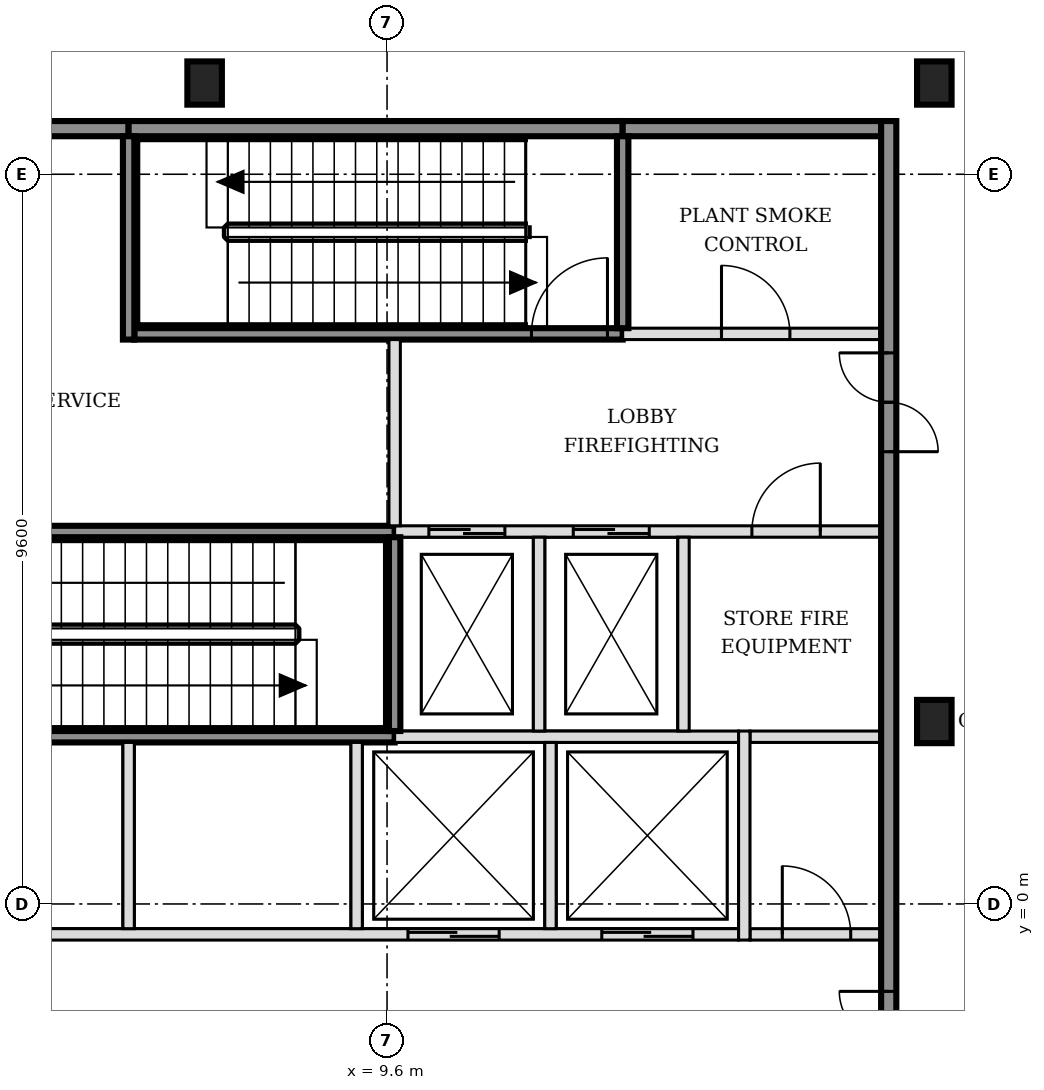
"""IFC4 building model, lengths in metres.
Left out: names, types, materials, properties, quantities, classifications, styles, units other than length and angle.
Written with IfcOpenShell. Run it as: python <this file> out.ifc"""

import sys

from ifc_helpers import new_model, si_unit, direction, frame, frame_2d, origin, origin_2d, place, context, subcontext, project, spatial, rectangle, i_section, extrude, element, fill, save


model = new_model("IFC4")
c1 = context("Model", 3, precision=1e-05, world=origin(), true_north=direction((0.0, 1.0)))
c2 = subcontext(c1, "Body", "Model", "MODEL_VIEW")
j1 = project(units=[si_unit("LENGTHUNIT", "METRE"), si_unit("PLANEANGLEUNIT", "RADIAN")], contexts=[c1])
p1 = place(None, origin())
s1 = spatial("IfcSite", under=j1, at=p1, CompositionType="ELEMENT")
p2 = place(p1, origin())
s2 = spatial("IfcBuilding", under=s1, at=p2, CompositionType="ELEMENT")
p3 = place(p2, frame((0.0, 0.0, 30.6)))
s3 = spatial("IfcBuildingStorey", under=s2, at=p3, CompositionType="ELEMENT", Elevation=30.6)
for number, where, z_axis, x_axis in (
    (1, (16.8, 2.4, -0.2), (0.0, 0.0, 1.0), (1.0, 0.0, 0.0)),
    (2, (7.2, 10.8, -0.2), (0.0, 0.0, 1.0), (1.0, 0.0, 0.0)),
    (3, (16.8, 10.8, -0.2), (0.0, 0.0, 1.0), (1.0, 0.0, 0.0)),
):
    element("IfcColumn", number, at=place(p3, frame(where, z_axis=z_axis, x_axis=x_axis)), inside=s3, PredefinedType="COLUMN", context=c2, shape_type="SweptSolid", body=[
        extrude(i_section(OverallWidth=0.454, OverallDepth=0.569, WebThickness=0.078, FlangeThickness=0.125, FilletRadius=0.015, at=origin_2d()), origin(), (0.0, 0.0, 1.0), 4.8),
    ])
p4 = place(p3, frame((-1.7, -0.4, 0.0), z_axis=(0.0, 0.0, 1.0), x_axis=(1.0, 0.0, 0.0)))
e4 = element("IfcWall", 4, at=p4, inside=s3, PredefinedType="SOLIDWALL", context=c2, shape_type="SweptSolid", body=[
    extrude(rectangle(XDim=15.925, YDim=0.15, at=frame_2d((7.962, 0.0))), origin(), (0.0, 0.0, 1.0), 4.6),
])
p5 = place(p4, frame((0.6, 0.0, 0.0)))
e5 = element("IfcOpeningElement", 5, at=p5, cuts=e4, PredefinedType="OPENING", context=c2, shape_type="SweptSolid", body=[
    extrude(rectangle(XDim=1.1, YDim=2.1, at=frame_2d((0.55, 1.05))), frame((0.0, 0.085, 0.0), z_axis=(0.0, -1.0, 0.0), x_axis=(1.0, 0.0, 0.0)), (0.0, 0.0, 1.0), 0.17),
])
p6 = place(p4, frame((3.1, 0.0, 0.0)))
e6 = element("IfcOpeningElement", 6, at=p6, cuts=e4, PredefinedType="OPENING", context=c2, shape_type="SweptSolid", body=[
    extrude(rectangle(XDim=1.1, YDim=2.1, at=frame_2d((0.55, 1.05))), frame((0.0, 0.085, 0.0), z_axis=(0.0, -1.0, 0.0), x_axis=(1.0, 0.0, 0.0)), (0.0, 0.0, 1.0), 0.17),
])
p7 = place(p4, frame((11.575, 0.0, 0.0)))
e7 = element("IfcOpeningElement", 7, at=p7, cuts=e4, PredefinedType="OPENING", context=c2, shape_type="SweptSolid", body=[
    extrude(rectangle(XDim=1.2, YDim=2.1, at=frame_2d((0.6, 1.05))), frame((0.0, 0.085, 0.0), z_axis=(0.0, -1.0, 0.0), x_axis=(1.0, 0.0, 0.0)), (0.0, 0.0, 1.0), 0.17),
])
p8 = place(p4, frame((14.125, 0.0, 0.0)))
e8 = element("IfcOpeningElement", 8, at=p8, cuts=e4, PredefinedType="OPENING", context=c2, shape_type="SweptSolid", body=[
    extrude(rectangle(XDim=1.2, YDim=2.1, at=frame_2d((0.6, 1.05))), frame((0.0, 0.085, 0.0), z_axis=(0.0, -1.0, 0.0), x_axis=(1.0, 0.0, 0.0)), (0.0, 0.0, 1.0), 0.17),
])
p9 = place(p3, frame((14.375, -0.4, 0.0), z_axis=(0.0, 0.0, 1.0), x_axis=(1.0, 0.0, 0.0)))
e9 = element("IfcWall", 9, at=p9, inside=s3, PredefinedType="PARTITIONING", context=c2, shape_type="SweptSolid", body=[
    extrude(rectangle(XDim=1.725, YDim=0.15, at=frame_2d((0.863, 0.0))), origin(), (0.0, 0.0, 1.0), 4.6),
])
p10 = place(p9, frame((0.425, 0.0, 0.0)))
e10 = element("IfcOpeningElement", 10, at=p10, cuts=e9, PredefinedType="OPENING", context=c2, shape_type="SweptSolid", body=[
    extrude(rectangle(XDim=0.9, YDim=2.1, at=frame_2d((0.45, 1.05))), frame((0.0, 0.085, 0.0), z_axis=(0.0, -1.0, 0.0), x_axis=(1.0, 0.0, 0.0)), (0.0, 0.0, 1.0), 0.17),
])
p11 = place(p3, frame((3.2, 2.2, 0.0), z_axis=(0.0, 0.0, 1.0), x_axis=(1.0, 0.0, 0.0)))
e11 = element("IfcWall", 11, at=p11, inside=s3, PredefinedType="SOLIDWALL", context=c2, shape_type="SweptSolid", body=[
    extrude(rectangle(XDim=6.5, YDim=0.15, at=frame_2d((3.25, 0.0))), origin(), (0.0, 0.0, 1.0), 4.6),
])
p12 = place(p3, frame((9.7, 2.2, 0.0), z_axis=(0.0, 0.0, 1.0), x_axis=(1.0, 0.0, 0.0)))
e12 = element("IfcWall", 12, at=p12, inside=s3, PredefinedType="SOLIDWALL", context=c2, shape_type="SweptSolid", body=[
    extrude(rectangle(XDim=4.525, YDim=0.15, at=frame_2d((2.263, 0.0))), origin(), (0.0, 0.0, 1.0), 4.6),
])
p13 = place(p3, frame((14.375, 2.2, 0.0), z_axis=(0.0, 0.0, 1.0), x_axis=(1.0, 0.0, 0.0)))
e13 = element("IfcWall", 13, at=p13, inside=s3, PredefinedType="PARTITIONING", context=c2, shape_type="SweptSolid", body=[
    extrude(rectangle(XDim=1.725, YDim=0.15, at=frame_2d((0.863, 0.0))), origin(), (0.0, 0.0, 1.0), 4.6),
])
p14 = place(p3, frame((3.275, 4.9, 0.0), z_axis=(0.0, 0.0, 1.0), x_axis=(1.0, 0.0, 0.0)))
e14 = element("IfcWall", 14, at=p14, inside=s3, PredefinedType="SOLIDWALL", context=c2, shape_type="SweptSolid", body=[
    extrude(rectangle(XDim=6.425, YDim=0.15, at=frame_2d((3.212, 0.0))), origin(), (0.0, 0.0, 1.0), 4.6),
])
p15 = place(p14, frame((0.1, 0.0, 0.0)))
e15 = element("IfcOpeningElement", 15, at=p15, cuts=e14, PredefinedType="OPENING", context=c2, shape_type="SweptSolid", body=[
    extrude(rectangle(XDim=1.0, YDim=2.1, at=frame_2d((0.5, 1.05))), frame((0.0, 0.085, 0.0), z_axis=(0.0, -1.0, 0.0), x_axis=(1.0, 0.0, 0.0)), (0.0, 0.0, 1.0), 0.17),
])
p16 = place(p3, frame((9.7, 4.9, 0.0), z_axis=(0.0, 0.0, 1.0), x_axis=(1.0, 0.0, 0.0)))
e16 = element("IfcWall", 16, at=p16, inside=s3, PredefinedType="SOLIDWALL", context=c2, shape_type="SweptSolid", body=[
    extrude(rectangle(XDim=6.4, YDim=0.15, at=frame_2d((3.2, 0.0))), origin(), (0.0, 0.0, 1.0), 4.6),
])
p17 = place(p16, frame((0.45, 0.0, 0.0)))
e17 = element("IfcOpeningElement", 17, at=p17, cuts=e16, PredefinedType="OPENING", context=c2, shape_type="SweptSolid", body=[
    extrude(rectangle(XDim=1.0, YDim=2.1, at=frame_2d((0.5, 1.05))), frame((0.0, 0.085, 0.0), z_axis=(0.0, -1.0, 0.0), x_axis=(1.0, 0.0, 0.0)), (0.0, 0.0, 1.0), 0.17),
])
p18 = place(p16, frame((2.35, 0.0, 0.0)))
e18 = element("IfcOpeningElement", 18, at=p18, cuts=e16, PredefinedType="OPENING", context=c2, shape_type="SweptSolid", body=[
    extrude(rectangle(XDim=1.0, YDim=2.1, at=frame_2d((0.5, 1.05))), frame((0.0, 0.085, 0.0), z_axis=(0.0, -1.0, 0.0), x_axis=(1.0, 0.0, 0.0)), (0.0, 0.0, 1.0), 0.17),
])
p19 = place(p16, frame((4.7, 0.0, 0.0)))
e19 = element("IfcOpeningElement", 19, at=p19, cuts=e16, PredefinedType="OPENING", context=c2, shape_type="SweptSolid", body=[
    extrude(rectangle(XDim=0.9, YDim=2.1, at=frame_2d((0.45, 1.05))), frame((0.0, 0.085, 0.0), z_axis=(0.0, -1.0, 0.0), x_axis=(1.0, 0.0, 0.0)), (0.0, 0.0, 1.0), 0.17),
])
p20 = place(p3, frame((6.275, 7.5, 0.0), z_axis=(0.0, 0.0, 1.0), x_axis=(1.0, 0.0, 0.0)))
e20 = element("IfcWall", 20, at=p20, inside=s3, PredefinedType="SOLIDWALL", context=c2, shape_type="SweptSolid", body=[
    extrude(rectangle(XDim=6.425, YDim=0.15, at=frame_2d((3.212, 0.0))), origin(), (0.0, 0.0, 1.0), 4.6),
])
p21 = place(p20, frame((5.225, 0.0, 0.0)))
e21 = element("IfcOpeningElement", 21, at=p21, cuts=e20, PredefinedType="OPENING", context=c2, shape_type="SweptSolid", body=[
    extrude(rectangle(XDim=1.0, YDim=2.1, at=frame_2d((0.5, 1.05))), frame((0.0, 0.085, 0.0), z_axis=(0.0, -1.0, 0.0), x_axis=(1.0, 0.0, 0.0)), (0.0, 0.0, 1.0), 0.17),
])
p22 = place(p3, frame((12.7, 7.5, 0.0), z_axis=(0.0, 0.0, 1.0), x_axis=(1.0, 0.0, 0.0)))
e22 = element("IfcWall", 22, at=p22, inside=s3, PredefinedType="SOLIDWALL", context=c2, shape_type="SweptSolid", body=[
    extrude(rectangle(XDim=3.4, YDim=0.15, at=frame_2d((1.7, 0.0))), origin(), (0.0, 0.0, 1.0), 4.6),
])
p23 = place(p22, frame((1.3, 0.0, 0.0)))
e23 = element("IfcOpeningElement", 23, at=p23, cuts=e22, PredefinedType="OPENING", context=c2, shape_type="SweptSolid", body=[
    extrude(rectangle(XDim=0.9, YDim=2.1, at=frame_2d((0.45, 1.05))), frame((0.0, 0.085, 0.0), z_axis=(0.0, -1.0, 0.0), x_axis=(1.0, 0.0, 0.0)), (0.0, 0.0, 1.0), 0.17),
])
p24 = place(p3, frame((-1.7, 10.2, 0.0), z_axis=(0.0, 0.0, 1.0), x_axis=(1.0, 0.0, 0.0)))
e24 = element("IfcWall", 24, at=p24, inside=s3, PredefinedType="SOLIDWALL", context=c2, shape_type="SweptSolid", body=[
    extrude(rectangle(XDim=7.9, YDim=0.2, at=frame_2d((3.95, 0.0))), origin(), (0.0, 0.0, 1.0), 4.6),
])
p25 = place(p3, frame((6.2, 10.2, 0.0), z_axis=(0.0, 0.0, 1.0), x_axis=(1.0, 0.0, 0.0)))
e25 = element("IfcWall", 25, at=p25, inside=s3, PredefinedType="SOLIDWALL", context=c2, shape_type="SweptSolid", body=[
    extrude(rectangle(XDim=6.5, YDim=0.2, at=frame_2d((3.25, 0.0))), origin(), (0.0, 0.0, 1.0), 4.6),
])
p26 = place(p3, frame((12.7, 10.2, 0.0), z_axis=(0.0, 0.0, 1.0), x_axis=(1.0, 0.0, 0.0)))
e26 = element("IfcWall", 26, at=p26, inside=s3, PredefinedType="SOLIDWALL", context=c2, shape_type="SweptSolid", body=[
    extrude(rectangle(XDim=3.4, YDim=0.2, at=frame_2d((1.7, 0.0))), origin(), (0.0, 0.0, 1.0), 4.6),
])
p27 = place(p3, frame((6.2, -0.325, 0.0), z_axis=(0.0, 0.0, 1.0), x_axis=(0.0, 1.0, 0.0)))
e27 = element("IfcWall", 27, at=p27, inside=s3, PredefinedType="SOLIDWALL", context=c2, shape_type="SweptSolid", body=[
    extrude(rectangle(XDim=2.45, YDim=0.15, at=frame_2d((1.225, 0.0))), origin(), (0.0, 0.0, 1.0), 4.6),
])
p28 = place(p3, frame((6.2, 7.425, 0.0), z_axis=(0.0, 0.0, 1.0), x_axis=(0.0, 1.0, 0.0)))
e28 = element("IfcWall", 28, at=p28, inside=s3, PredefinedType="SOLIDWALL", context=c2, shape_type="SweptSolid", body=[
    extrude(rectangle(XDim=2.675, YDim=0.15, at=frame_2d((1.337, 0.0))), origin(), (0.0, 0.0, 1.0), 4.6),
])
p29 = place(p3, frame((9.2, -0.325, 0.0), z_axis=(0.0, 0.0, 1.0), x_axis=(0.0, 1.0, 0.0)))
e29 = element("IfcWall", 29, at=p29, inside=s3, PredefinedType="SOLIDWALL", context=c2, shape_type="SweptSolid", body=[
    extrude(rectangle(XDim=2.45, YDim=0.15, at=frame_2d((1.225, 0.0))), origin(), (0.0, 0.0, 1.0), 4.6),
])
p30 = place(p3, frame((9.7, 2.275, 0.0), z_axis=(0.0, 0.0, 1.0), x_axis=(0.0, 1.0, 0.0)))
e30 = element("IfcWall", 30, at=p30, inside=s3, PredefinedType="SOLIDWALL", context=c2, shape_type="SweptSolid", body=[
    extrude(rectangle(XDim=2.55, YDim=0.15, at=frame_2d((1.275, 0.0))), origin(), (0.0, 0.0, 1.0), 4.6),
])
p31 = place(p3, frame((9.7, 4.975, 0.0), z_axis=(0.0, 0.0, 1.0), x_axis=(0.0, 1.0, 0.0)))
e31 = element("IfcWall", 31, at=p31, inside=s3, PredefinedType="SOLIDWALL", context=c2, shape_type="SweptSolid", body=[
    extrude(rectangle(XDim=2.45, YDim=0.15, at=frame_2d((1.225, 0.0))), origin(), (0.0, 0.0, 1.0), 4.6),
])
p32 = place(p3, frame((11.6, 2.275, 0.0), z_axis=(0.0, 0.0, 1.0), x_axis=(0.0, 1.0, 0.0)))
e32 = element("IfcWall", 32, at=p32, inside=s3, PredefinedType="SOLIDWALL", context=c2, shape_type="SweptSolid", body=[
    extrude(rectangle(XDim=2.55, YDim=0.15, at=frame_2d((1.275, 0.0))), origin(), (0.0, 0.0, 1.0), 4.6),
])
p33 = place(p3, frame((11.75, -0.325, 0.0), z_axis=(0.0, 0.0, 1.0), x_axis=(0.0, 1.0, 0.0)))
e33 = element("IfcWall", 33, at=p33, inside=s3, PredefinedType="SOLIDWALL", context=c2, shape_type="SweptSolid", body=[
    extrude(rectangle(XDim=2.45, YDim=0.15, at=frame_2d((1.225, 0.0))), origin(), (0.0, 0.0, 1.0), 4.6),
])
p34 = place(p3, frame((12.7, 7.575, 0.0), z_axis=(0.0, 0.0, 1.0), x_axis=(0.0, 1.0, 0.0)))
e34 = element("IfcWall", 34, at=p34, inside=s3, PredefinedType="SOLIDWALL", context=c2, shape_type="SweptSolid", body=[
    extrude(rectangle(XDim=2.525, YDim=0.15, at=frame_2d((1.263, 0.0))), origin(), (0.0, 0.0, 1.0), 4.6),
])
p35 = place(p3, frame((13.5, 2.275, 0.0), z_axis=(0.0, 0.0, 1.0), x_axis=(0.0, 1.0, 0.0)))
e35 = element("IfcWall", 35, at=p35, inside=s3, PredefinedType="SOLIDWALL", context=c2, shape_type="SweptSolid", body=[
    extrude(rectangle(XDim=2.55, YDim=0.15, at=frame_2d((1.275, 0.0))), origin(), (0.0, 0.0, 1.0), 4.6),
])
p36 = place(p3, frame((14.3, -0.475, 0.0), z_axis=(0.0, 0.0, 1.0), x_axis=(0.0, 1.0, 0.0)))
e36 = element("IfcWall", 36, at=p36, inside=s3, PredefinedType="SOLIDWALL", context=c2, shape_type="SweptSolid", body=[
    extrude(rectangle(XDim=2.75, YDim=0.15, at=frame_2d((1.375, 0.0))), origin(), (0.0, 0.0, 1.0), 4.6),
])
p37 = place(p3, frame((16.2, -5.5, 0.0), z_axis=(0.0, 0.0, 1.0), x_axis=(0.0, 1.0, 0.0)))
e37 = element("IfcWall", 37, at=p37, inside=s3, PredefinedType="SOLIDWALL", context=c2, shape_type="SweptSolid", body=[
    extrude(rectangle(XDim=15.8, YDim=0.2, at=frame_2d((7.9, 0.0))), origin(), (0.0, 0.0, 1.0), 4.6),
])
p38 = place(p37, frame((3.05, 0.0, 0.0)))
e38 = element("IfcOpeningElement", 38, at=p38, cuts=e37, PredefinedType="OPENING", context=c2, shape_type="SweptSolid", body=[
    extrude(rectangle(XDim=1.3, YDim=2.1, at=frame_2d((0.65, 1.05))), frame((0.0, 0.11, 0.0), z_axis=(0.0, -1.0, 0.0), x_axis=(1.0, 0.0, 0.0)), (0.0, 0.0, 1.0), 0.22),
])
p39 = place(p37, frame((11.45, 0.0, 0.0)))
e39 = element("IfcOpeningElement", 39, at=p39, cuts=e37, PredefinedType="OPENING", context=c2, shape_type="SweptSolid", body=[
    extrude(rectangle(XDim=1.3, YDim=2.1, at=frame_2d((0.65, 1.05))), frame((0.0, 0.11, 0.0), z_axis=(0.0, -1.0, 0.0), x_axis=(1.0, 0.0, 0.0)), (0.0, 0.0, 1.0), 0.22),
])
p40 = place(p7, origin())
e40 = element("IfcDoor", 40, at=p40, inside=s3, OperationType="DOUBLE_DOOR_SLIDING", PredefinedType="DOOR", context=c2, shape_type="SweptSolid", body=[
    extrude(rectangle(XDim=1.2, YDim=2.1, at=frame_2d((0.6, 1.05))), frame((0.0, 0.025, 0.0), z_axis=(0.0, -1.0, 0.0), x_axis=(1.0, 0.0, 0.0)), (0.0, 0.0, 1.0), 0.05),
])
fill(e7, e40)
p41 = place(p8, origin())
e41 = element("IfcDoor", 41, at=p41, inside=s3, OperationType="DOUBLE_DOOR_SLIDING", PredefinedType="DOOR", context=c2, shape_type="SweptSolid", body=[
    extrude(rectangle(XDim=1.2, YDim=2.1, at=frame_2d((0.6, 1.05))), frame((0.0, 0.025, 0.0), z_axis=(0.0, -1.0, 0.0), x_axis=(1.0, 0.0, 0.0)), (0.0, 0.0, 1.0), 0.05),
])
fill(e8, e41)
p42 = place(p17, origin())
e42 = element("IfcDoor", 42, at=p42, inside=s3, OperationType="DOUBLE_DOOR_SLIDING", PredefinedType="DOOR", context=c2, shape_type="SweptSolid", body=[
    extrude(rectangle(XDim=1.0, YDim=2.1, at=frame_2d((0.5, 1.05))), frame((0.0, 0.025, 0.0), z_axis=(0.0, -1.0, 0.0), x_axis=(1.0, 0.0, 0.0)), (0.0, 0.0, 1.0), 0.05),
])
fill(e17, e42)
p43 = place(p18, origin())
e43 = element("IfcDoor", 43, at=p43, inside=s3, OperationType="DOUBLE_DOOR_SLIDING", PredefinedType="DOOR", context=c2, shape_type="SweptSolid", body=[
    extrude(rectangle(XDim=1.0, YDim=2.1, at=frame_2d((0.5, 1.05))), frame((0.0, 0.025, 0.0), z_axis=(0.0, -1.0, 0.0), x_axis=(1.0, 0.0, 0.0)), (0.0, 0.0, 1.0), 0.05),
])
fill(e18, e43)
p44 = place(p21, origin())
e44 = element("IfcDoor", 44, at=p44, inside=s3, OperationType="SINGLE_SWING_RIGHT", PredefinedType="DOOR", context=c2, shape_type="SweptSolid", body=[
    extrude(rectangle(XDim=1.0, YDim=2.1, at=frame_2d((0.5, 1.05))), frame((0.0, 0.025, 0.0), z_axis=(0.0, -1.0, 0.0), x_axis=(1.0, 0.0, 0.0)), (0.0, 0.0, 1.0), 0.05),
])
fill(e21, e44)
p45 = place(p38, origin())
e45 = element("IfcDoor", 45, at=p45, inside=s3, OperationType="DOUBLE_DOOR_SINGLE_SWING", PredefinedType="DOOR", context=c2, shape_type="SweptSolid", body=[
    extrude(rectangle(XDim=1.3, YDim=2.1, at=frame_2d((0.65, 1.05))), frame((0.0, 0.025, 0.0), z_axis=(0.0, -1.0, 0.0), x_axis=(1.0, 0.0, 0.0)), (0.0, 0.0, 1.0), 0.05),
])
fill(e38, e45)
p46 = place(p39, origin())
e46 = element("IfcDoor", 46, at=p46, inside=s3, OperationType="DOUBLE_DOOR_SINGLE_SWING", PredefinedType="DOOR", context=c2, shape_type="SweptSolid", body=[
    extrude(rectangle(XDim=1.3, YDim=2.1, at=frame_2d((0.65, 1.05))), frame((0.0, 0.025, 0.0), z_axis=(0.0, -1.0, 0.0), x_axis=(1.0, 0.0, 0.0)), (0.0, 0.0, 1.0), 0.05),
])
fill(e39, e46)
p47 = place(p10, origin())
e47 = element("IfcDoor", 47, at=p47, inside=s3, OperationType="SINGLE_SWING_LEFT", PredefinedType="DOOR", context=c2, shape_type="SweptSolid", body=[
    extrude(rectangle(XDim=0.9, YDim=2.1, at=frame_2d((0.45, 1.05))), frame((0.0, 0.025, 0.0), z_axis=(0.0, -1.0, 0.0), x_axis=(1.0, 0.0, 0.0)), (0.0, 0.0, 1.0), 0.05),
])
fill(e10, e47)
p48 = place(p19, origin())
e48 = element("IfcDoor", 48, at=p48, inside=s3, OperationType="SINGLE_SWING_RIGHT", PredefinedType="DOOR", context=c2, shape_type="SweptSolid", body=[
    extrude(rectangle(XDim=0.9, YDim=2.1, at=frame_2d((0.45, 1.05))), frame((0.0, 0.025, 0.0), z_axis=(0.0, -1.0, 0.0), x_axis=(1.0, 0.0, 0.0)), (0.0, 0.0, 1.0), 0.05),
])
fill(e19, e48)
p49 = place(p23, origin())
e49 = element("IfcDoor", 49, at=p49, inside=s3, OperationType="SINGLE_SWING_LEFT", PredefinedType="DOOR", context=c2, shape_type="SweptSolid", body=[
    extrude(rectangle(XDim=0.9, YDim=2.1, at=frame_2d((0.45, 1.05))), frame((0.0, 0.025, 0.0), z_axis=(0.0, -1.0, 0.0), x_axis=(1.0, 0.0, 0.0)), (0.0, 0.0, 1.0), 0.05),
])
fill(e23, e49)
save(model, sys.argv[1])
